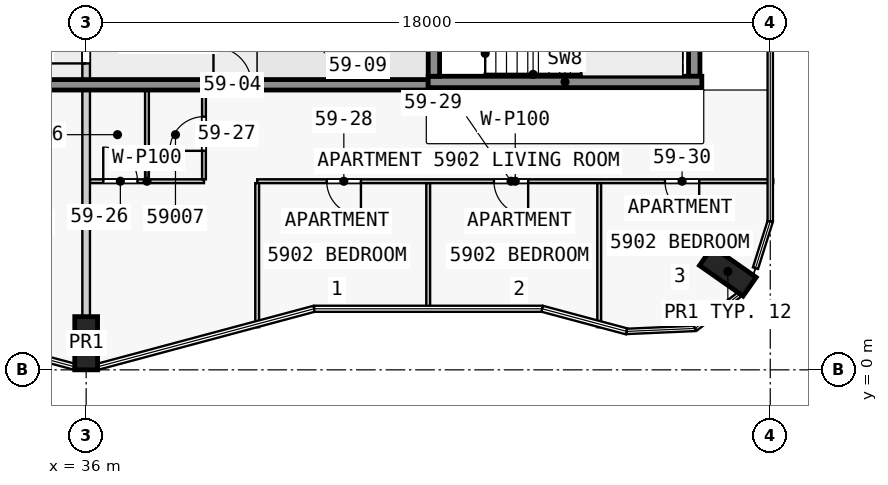
"""IFC4 building model, lengths in metres.
Left out: names, types, materials, properties, quantities, classifications, styles, units other than length and angle.
Written with IfcOpenShell. Run it as: python <this file> out.ifc"""

import sys

from ifc_helpers import new_model, si_unit, direction, frame, frame_2d, origin, origin_2d, place, context, subcontext, project, spatial, rectangle, extrude, element, fill, save


model = new_model("IFC4")
c1 = context("Model", 3, precision=1e-05, world=origin(), true_north=direction((0.0, 1.0)))
c2 = subcontext(c1, "Body", "Model", "MODEL_VIEW")
j1 = project(units=[si_unit("LENGTHUNIT", "METRE"), si_unit("PLANEANGLEUNIT", "RADIAN")], contexts=[c1])
p1 = place(None, origin())
s1 = spatial("IfcSite", under=j1, at=p1, CompositionType="ELEMENT")
p2 = place(p1, origin())
s2 = spatial("IfcBuilding", under=s1, at=p2, CompositionType="ELEMENT")
p3 = place(p2, frame((0.0, 0.0, 225.9)))
s3 = spatial("IfcBuildingStorey", under=s2, at=p3, CompositionType="ELEMENT", Elevation=225.9)
for number, where, z_axis, x_axis in (
    (1, (36.0, 0.7, 0.0), (0.0, 0.0, 1.0), (1.0, 0.0, 0.0)),
    (2, (52.884, 2.59, 0.0), (0.0, 0.0, 1.0), (0.574, 0.819, 0.0)),
):
    element("IfcColumn", number, at=place(p3, frame(where, z_axis=z_axis, x_axis=x_axis)), inside=s3, PredefinedType="COLUMN", context=c2, shape_type="SweptSolid", body=[
        extrude(rectangle(XDim=0.6, YDim=1.4, at=origin_2d()), origin(), (0.0, 0.0, 1.0), 3.5),
    ])
p4 = place(p3, frame((45.15, 7.725, 0.0), z_axis=(0.0, 0.0, 1.0), x_axis=(0.0, 1.0, 0.0)))
e3 = element("IfcWall", 3, at=p4, inside=s3, PredefinedType="SHEAR", context=c2, shape_type="SweptSolid", body=[
    extrude(rectangle(XDim=2.55, YDim=0.3, at=frame_2d((1.275, 0.0))), origin(), (0.0, 0.0, 1.0), 3.5),
])
p5 = place(p4, frame((0.725, 0.0, 0.0)))
e4 = element("IfcOpeningElement", 4, at=p5, cuts=e3, PredefinedType="OPENING", context=c2, shape_type="SweptSolid", body=[
    extrude(rectangle(XDim=1.1, YDim=2.1, at=frame_2d((0.55, 1.05))), frame((0.0, 0.16, 0.0), z_axis=(0.0, -1.0, 0.0), x_axis=(1.0, 0.0, 0.0)), (0.0, 0.0, 1.0), 0.32),
])
p6 = place(p3, frame((52.0, 7.725, 0.0), z_axis=(0.0, 0.0, 1.0), x_axis=(0.0, 1.0, 0.0)))
e5 = element("IfcWall", 5, at=p6, inside=s3, PredefinedType="SHEAR", context=c2, shape_type="SweptSolid", body=[
    extrude(rectangle(XDim=2.55, YDim=0.3, at=frame_2d((1.275, 0.0))), origin(), (0.0, 0.0, 1.0), 3.5),
])
p7 = place(p3, frame((45.0, 7.575, 0.0), z_axis=(0.0, 0.0, 1.0), x_axis=(1.0, 0.0, 0.0)))
e6 = element("IfcWall", 6, at=p7, inside=s3, PredefinedType="SHEAR", context=c2, shape_type="SweptSolid", body=[
    extrude(rectangle(XDim=7.2, YDim=0.3, at=frame_2d((3.6, 0.0))), origin(), (0.0, 0.0, 1.0), 3.5),
])
p8 = place(p3, frame((22.5, 7.5, 0.0), z_axis=(0.0, 0.0, 1.0), x_axis=(1.0, 0.0, 0.0)))
e7 = element("IfcWall", 7, at=p8, inside=s3, PredefinedType="SHEAR", context=c2, shape_type="SweptSolid", body=[
    extrude(rectangle(XDim=22.5, YDim=0.275, at=frame_2d((11.25, 0.0))), origin(), (0.0, 0.0, 1.0), 3.05),
])
p9 = place(p8, frame((1.75, 0.0, 0.0)))
e8 = element("IfcOpeningElement", 8, at=p9, cuts=e7, PredefinedType="OPENING", context=c2, shape_type="SweptSolid", body=[
    extrude(rectangle(XDim=1.0, YDim=2.1, at=frame_2d((0.5, 1.05))), frame((0.0, 0.147, 0.0), z_axis=(0.0, -1.0, 0.0), x_axis=(1.0, 0.0, 0.0)), (0.0, 0.0, 1.0), 0.295),
])
p10 = place(p8, frame((6.25, 0.0, 0.0)))
e9 = element("IfcOpeningElement", 9, at=p10, cuts=e7, PredefinedType="OPENING", context=c2, shape_type="SweptSolid", body=[
    extrude(rectangle(XDim=1.0, YDim=2.1, at=frame_2d((0.5, 1.05))), frame((0.0, 0.147, 0.0), z_axis=(0.0, -1.0, 0.0), x_axis=(1.0, 0.0, 0.0)), (0.0, 0.0, 1.0), 0.295),
])
p11 = place(p8, frame((10.75, 0.0, 0.0)))
e10 = element("IfcOpeningElement", 10, at=p11, cuts=e7, PredefinedType="OPENING", context=c2, shape_type="SweptSolid", body=[
    extrude(rectangle(XDim=1.0, YDim=2.1, at=frame_2d((0.5, 1.05))), frame((0.0, 0.147, 0.0), z_axis=(0.0, -1.0, 0.0), x_axis=(1.0, 0.0, 0.0)), (0.0, 0.0, 1.0), 0.295),
])
p12 = place(p8, frame((16.85, 0.0, 0.0)))
e11 = element("IfcOpeningElement", 11, at=p12, cuts=e7, PredefinedType="OPENING", context=c2, shape_type="SweptSolid", body=[
    extrude(rectangle(XDim=1.0, YDim=2.1, at=frame_2d((0.5, 1.05))), frame((0.0, 0.147, 0.0), z_axis=(0.0, -1.0, 0.0), x_axis=(1.0, 0.0, 0.0)), (0.0, 0.0, 1.0), 0.295),
])
p13 = place(p3, frame((54.08, 4.962, 0.0), z_axis=(0.0, 0.0, 1.0), x_axis=(-1.0, 0.0, 0.0)))
e12 = element("IfcWall", 12, at=p13, inside=s3, PredefinedType="PARTITIONING", context=c2, shape_type="SweptSolid", body=[
    extrude(rectangle(XDim=13.58, YDim=0.1, at=frame_2d((6.79, 0.0))), origin(), (0.0, 0.0, 1.0), 3.05),
])
p14 = place(p13, frame((10.85, 0.0, 0.0)))
e13 = element("IfcOpeningElement", 13, at=p14, cuts=e12, PredefinedType="OPENING", context=c2, shape_type="SweptSolid", body=[
    extrude(rectangle(XDim=0.9, YDim=2.1, at=frame_2d((0.45, 1.05))), frame((0.0, 0.06, 0.0), z_axis=(0.0, -1.0, 0.0), x_axis=(1.0, 0.0, 0.0)), (0.0, 0.0, 1.0), 0.12),
])
p15 = place(p13, frame((6.45, 0.0, 0.0)))
e14 = element("IfcOpeningElement", 14, at=p15, cuts=e12, PredefinedType="OPENING", context=c2, shape_type="SweptSolid", body=[
    extrude(rectangle(XDim=0.9, YDim=2.1, at=frame_2d((0.45, 1.05))), frame((0.0, 0.06, 0.0), z_axis=(0.0, -1.0, 0.0), x_axis=(1.0, 0.0, 0.0)), (0.0, 0.0, 1.0), 0.12),
])
p16 = place(p13, frame((1.95, 0.0, 0.0)))
e15 = element("IfcOpeningElement", 15, at=p16, cuts=e12, PredefinedType="OPENING", context=c2, shape_type="SweptSolid", body=[
    extrude(rectangle(XDim=0.9, YDim=2.1, at=frame_2d((0.45, 1.05))), frame((0.0, 0.06, 0.0), z_axis=(0.0, -1.0, 0.0), x_axis=(1.0, 0.0, 0.0)), (0.0, 0.0, 1.0), 0.12),
])
p17 = place(p3, frame((36.1, 4.962, 0.0), z_axis=(0.0, 0.0, 1.0), x_axis=(1.0, 0.0, 0.0)))
e16 = element("IfcWall", 16, at=p17, inside=s3, PredefinedType="PARTITIONING", context=c2, shape_type="SweptSolid", body=[
    extrude(rectangle(XDim=3.0, YDim=0.1, at=frame_2d((1.5, 0.0))), origin(), (0.0, 0.0, 1.0), 3.05),
])
p18 = place(p17, frame((0.35, 0.0, 0.0)))
e17 = element("IfcOpeningElement", 17, at=p18, cuts=e16, PredefinedType="OPENING", context=c2, shape_type="SweptSolid", body=[
    extrude(rectangle(XDim=0.9, YDim=2.1, at=frame_2d((0.45, 1.05))), frame((0.0, 0.06, 0.0), z_axis=(0.0, -1.0, 0.0), x_axis=(1.0, 0.0, 0.0)), (0.0, 0.0, 1.0), 0.12),
])
p19 = place(p3, frame((36.0, 1.4, 0.0), z_axis=(0.0, 0.0, 1.0), x_axis=(0.0, 1.0, 0.0)))
e18 = element("IfcWall", 18, at=p19, inside=s3, PredefinedType="PARTITIONING", context=c2, shape_type="SweptSolid", body=[
    extrude(rectangle(XDim=5.963, YDim=0.2, at=frame_2d((2.981, 0.0))), origin(), (0.0, 0.0, 1.0), 3.05),
])
p20 = place(p3, frame((37.6, 5.012, 0.0), z_axis=(0.0, 0.0, 1.0), x_axis=(0.0, 1.0, 0.0)))
e19 = element("IfcWall", 19, at=p20, inside=s3, PredefinedType="PARTITIONING", context=c2, shape_type="SweptSolid", body=[
    extrude(rectangle(XDim=2.35, YDim=0.1, at=frame_2d((1.175, 0.0))), origin(), (0.0, 0.0, 1.0), 3.05),
])
p21 = place(p3, frame((39.1, 5.012, 0.0), z_axis=(0.0, 0.0, 1.0), x_axis=(0.0, 1.0, 0.0)))
e20 = element("IfcWall", 20, at=p21, inside=s3, PredefinedType="PARTITIONING", context=c2, shape_type="SweptSolid", body=[
    extrude(rectangle(XDim=2.35, YDim=0.1, at=frame_2d((1.175, 0.0))), origin(), (0.0, 0.0, 1.0), 3.05),
])
p22 = place(p21, frame((0.75, 0.0, 0.0)))
e21 = element("IfcOpeningElement", 21, at=p22, cuts=e20, PredefinedType="OPENING", context=c2, shape_type="SweptSolid", body=[
    extrude(rectangle(XDim=0.9, YDim=2.1, at=frame_2d((0.45, 1.05))), frame((0.0, 0.06, 0.0), z_axis=(0.0, -1.0, 0.0), x_axis=(1.0, 0.0, 0.0)), (0.0, 0.0, 1.0), 0.12),
])
p23 = place(p3, frame((40.5, 4.913, 0.0), z_axis=(0.0, 0.0, 1.0), x_axis=(0.0, -1.0, 0.0)))
e22 = element("IfcWall", 22, at=p23, inside=s3, PredefinedType="PARTITIONING", context=c2, shape_type="SweptSolid", body=[
    extrude(rectangle(XDim=3.79, YDim=0.1, at=frame_2d((1.895, 0.0))), origin(), (0.0, 0.0, 1.0), 3.05),
])
p24 = place(p3, frame((45.0, 1.527, 0.0), z_axis=(0.0, 0.0, 1.0), x_axis=(0.0, 1.0, 0.0)))
e23 = element("IfcWall", 23, at=p24, inside=s3, PredefinedType="PARTITIONING", context=c2, shape_type="SweptSolid", body=[
    extrude(rectangle(XDim=3.386, YDim=0.1, at=frame_2d((1.693, 0.0))), origin(), (0.0, 0.0, 1.0), 3.05),
])
p25 = place(p3, frame((49.5, 1.122, 0.0), z_axis=(0.0, 0.0, 1.0), x_axis=(0.0, 1.0, 0.0)))
e24 = element("IfcWall", 24, at=p25, inside=s3, PredefinedType="PARTITIONING", context=c2, shape_type="SweptSolid", body=[
    extrude(rectangle(XDim=3.79, YDim=0.1, at=frame_2d((1.895, 0.0))), origin(), (0.0, 0.0, 1.0), 3.05),
])
p26 = place(p3, frame((36.0, 7.462, 0.0), z_axis=(0.0, 0.0, 1.0), x_axis=(0.0, 1.0, 0.0)))
e25 = element("IfcWall", 25, at=p26, inside=s3, PredefinedType="PARTITIONING", context=c2, shape_type="SweptSolid", body=[
    extrude(rectangle(XDim=3.075, YDim=0.2, at=frame_2d((1.538, 0.0))), origin(), (0.0, 0.0, 1.0), 3.05),
])
p27 = place(p26, frame((0.6, 0.0, 0.0)))
e26 = element("IfcOpeningElement", 26, at=p27, cuts=e25, PredefinedType="OPENING", context=c2, shape_type="SweptSolid", body=[
    extrude(rectangle(XDim=1.8, YDim=2.1, at=frame_2d((0.9, 1.05))), frame((0.0, 0.11, 0.0), z_axis=(0.0, -1.0, 0.0), x_axis=(1.0, 0.0, 0.0)), (0.0, 0.0, 1.0), 0.22),
])
p28 = place(p12, origin())
e27 = element("IfcDoor", 27, at=p28, inside=s3, OperationType="SINGLE_SWING_RIGHT", PredefinedType="DOOR", context=c2, shape_type="SweptSolid", body=[
    extrude(rectangle(XDim=1.0, YDim=2.1, at=frame_2d((0.5, 1.05))), frame((0.0, 0.025, 0.0), z_axis=(0.0, -1.0, 0.0), x_axis=(1.0, 0.0, 0.0)), (0.0, 0.0, 1.0), 0.05),
])
fill(e11, e27)
p29 = place(p27, origin())
e28 = element("IfcDoor", 28, at=p29, inside=s3, OperationType="SINGLE_SWING_LEFT", PredefinedType="DOOR", context=c2, shape_type="SweptSolid", body=[
    extrude(rectangle(XDim=1.8, YDim=2.1, at=frame_2d((0.9, 1.05))), frame((0.0, 0.025, 0.0), z_axis=(0.0, -1.0, 0.0), x_axis=(1.0, 0.0, 0.0)), (0.0, 0.0, 1.0), 0.05),
])
fill(e26, e28)
p30 = place(p18, origin())
e29 = element("IfcDoor", 29, at=p30, inside=s3, OperationType="SINGLE_SWING_LEFT", PredefinedType="DOOR", context=c2, shape_type="SweptSolid", body=[
    extrude(rectangle(XDim=0.9, YDim=2.1, at=frame_2d((0.45, 1.05))), frame((0.0, 0.025, 0.0), z_axis=(0.0, -1.0, 0.0), x_axis=(1.0, 0.0, 0.0)), (0.0, 0.0, 1.0), 0.05),
])
fill(e17, e29)
p31 = place(p22, origin())
e30 = element("IfcDoor", 30, at=p31, inside=s3, OperationType="SINGLE_SWING_RIGHT", PredefinedType="DOOR", context=c2, shape_type="SweptSolid", body=[
    extrude(rectangle(XDim=0.9, YDim=2.1, at=frame_2d((0.45, 1.05))), frame((0.0, 0.025, 0.0), z_axis=(0.0, -1.0, 0.0), x_axis=(1.0, 0.0, 0.0)), (0.0, 0.0, 1.0), 0.05),
])
fill(e21, e30)
p32 = place(p14, origin())
e31 = element("IfcDoor", 31, at=p32, inside=s3, OperationType="SINGLE_SWING_RIGHT", PredefinedType="DOOR", context=c2, shape_type="SweptSolid", body=[
    extrude(rectangle(XDim=0.9, YDim=2.1, at=frame_2d((0.45, 1.05))), frame((0.0, 0.025, 0.0), z_axis=(0.0, -1.0, 0.0), x_axis=(1.0, 0.0, 0.0)), (0.0, 0.0, 1.0), 0.05),
])
fill(e13, e31)
p33 = place(p15, origin())
e32 = element("IfcDoor", 32, at=p33, inside=s3, OperationType="SINGLE_SWING_RIGHT", PredefinedType="DOOR", context=c2, shape_type="SweptSolid", body=[
    extrude(rectangle(XDim=0.9, YDim=2.1, at=frame_2d((0.45, 1.05))), frame((0.0, 0.025, 0.0), z_axis=(0.0, -1.0, 0.0), x_axis=(1.0, 0.0, 0.0)), (0.0, 0.0, 1.0), 0.05),
])
fill(e14, e32)
p34 = place(p16, origin())
e33 = element("IfcDoor", 33, at=p34, inside=s3, OperationType="SINGLE_SWING_LEFT", PredefinedType="DOOR", context=c2, shape_type="SweptSolid", body=[
    extrude(rectangle(XDim=0.9, YDim=2.1, at=frame_2d((0.45, 1.05))), frame((0.0, 0.025, 0.0), z_axis=(0.0, -1.0, 0.0), x_axis=(1.0, 0.0, 0.0)), (0.0, 0.0, 1.0), 0.05),
])
fill(e15, e33)
save(model, sys.argv[1])
